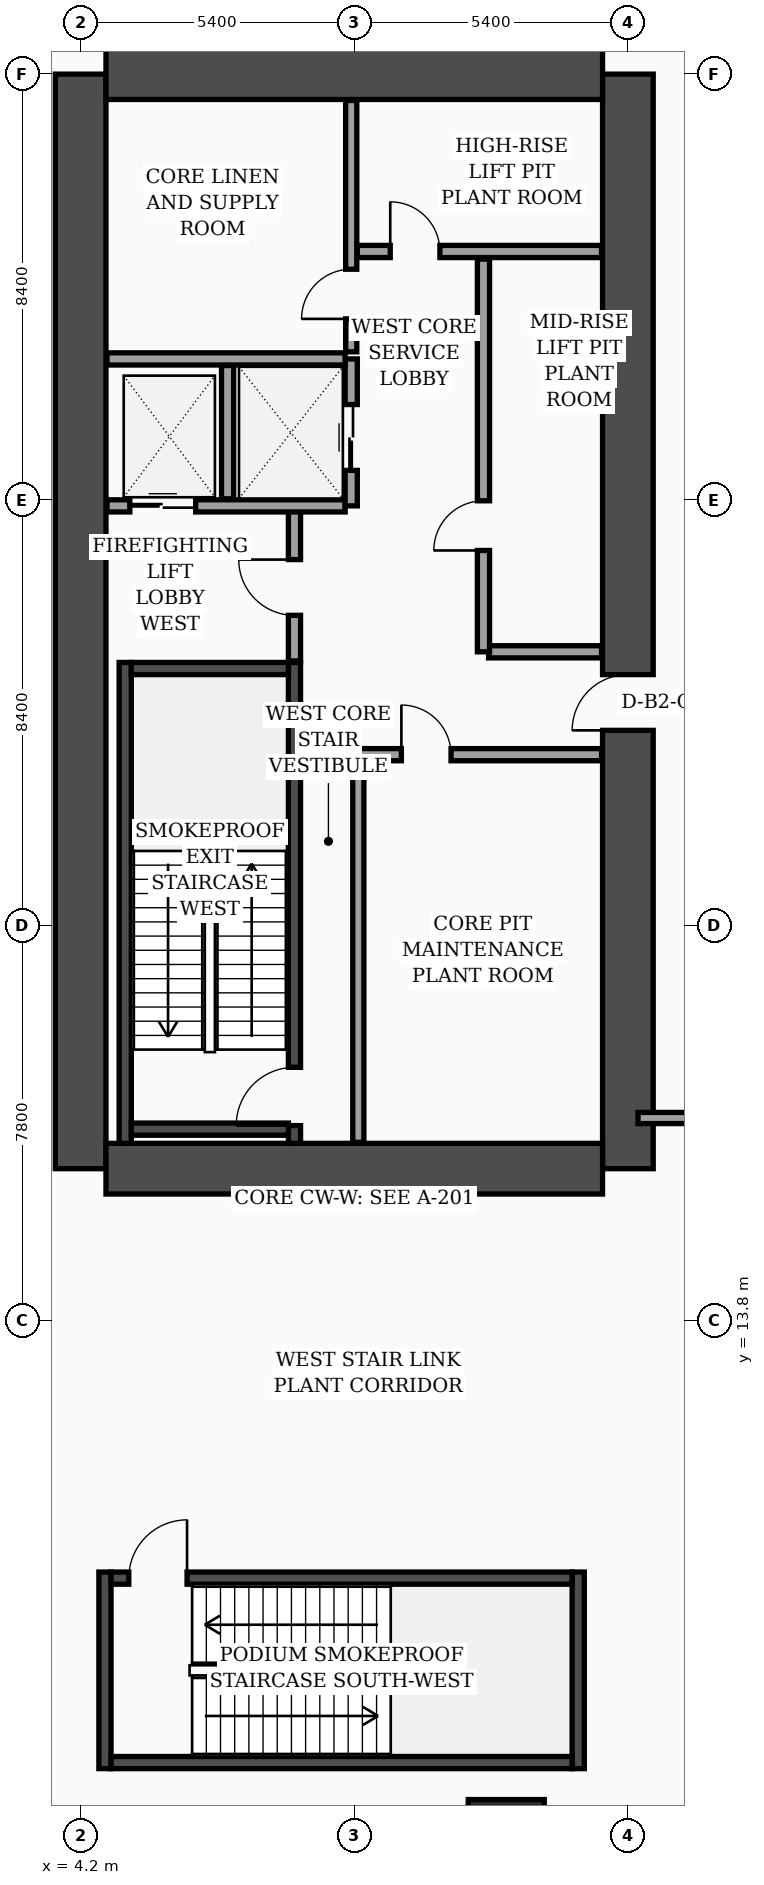
"""IFC4 building model, lengths in metres.
Left out: names, types, materials, properties, quantities, classifications, styles, units other than length and angle.
Written with IfcOpenShell. Run it as: python <this file> out.ifc"""

import sys

from ifc_helpers import new_model, si_unit, direction, frame, frame_2d, origin, origin_2d, place, context, subcontext, project, spatial, rectangle, extrude, element, fill, save


model = new_model("IFC4")
c1 = context("Model", 3, precision=1e-05, world=origin(), true_north=direction((0.0, 1.0)))
c2 = subcontext(c1, "Body", "Model", "MODEL_VIEW")
j1 = project(units=[si_unit("LENGTHUNIT", "METRE"), si_unit("PLANEANGLEUNIT", "RADIAN")], contexts=[c1])
p1 = place(None, origin())
s1 = spatial("IfcSite", under=j1, at=p1, CompositionType="ELEMENT")
p2 = place(p1, origin())
s2 = spatial("IfcBuilding", under=s1, at=p2, CompositionType="ELEMENT")
p3 = place(p2, frame((0.0, 0.0, -10.4)))
s3 = spatial("IfcBuildingStorey", under=s2, at=p3, CompositionType="ELEMENT", Elevation=-10.4)
p4 = place(p3, frame((4.2, 16.8, 0.0), z_axis=(0.0, 0.0, 1.0), x_axis=(0.0, 1.0, 0.0)))
e1 = element("IfcWall", 1, at=p4, inside=s3, PredefinedType="SHEAR", context=c2, shape_type="SweptSolid", body=[
    extrude(rectangle(XDim=21.6, YDim=1.0, at=frame_2d((10.8, 0.0))), origin(), (0.0, 0.0, 1.0), 4.88),
])
p5 = place(p3, frame((15.0, 16.8, 0.0), z_axis=(0.0, 0.0, 1.0), x_axis=(0.0, 1.0, 0.0)))
e2 = element("IfcWall", 2, at=p5, inside=s3, PredefinedType="SHEAR", context=c2, shape_type="SweptSolid", body=[
    extrude(rectangle(XDim=21.6, YDim=1.0, at=frame_2d((10.8, 0.0))), origin(), (0.0, 0.0, 1.0), 4.88),
])
p6 = place(p5, frame((8.65, 0.0, 0.0)))
e3 = element("IfcOpeningElement", 3, at=p6, cuts=e2, PredefinedType="OPENING", context=c2, shape_type="SweptSolid", body=[
    extrude(rectangle(XDim=1.1, YDim=2.2, at=frame_2d((0.55, 1.1))), frame((0.0, 0.51, 0.0), z_axis=(0.0, -1.0, 0.0), x_axis=(1.0, 0.0, 0.0)), (0.0, 0.0, 1.0), 1.02),
])
for number, where, z_axis, x_axis in (
    (4, (4.7, 38.4, 0.0), (0.0, 0.0, 1.0), (1.0, 0.0, 0.0)),
    (5, (4.7, 16.8, 0.0), (0.0, 0.0, 1.0), (1.0, 0.0, 0.0)),
):
    element("IfcWall", number, at=place(p3, frame(where, z_axis=z_axis, x_axis=x_axis)), inside=s3, PredefinedType="SHEAR", context=c2, shape_type="SweptSolid", body=[
        extrude(rectangle(XDim=9.8, YDim=1.0, at=frame_2d((4.9, 0.0))), origin(), (0.0, 0.0, 1.0), 4.88),
    ])
p7 = place(p3, frame((5.08, 17.3, 0.0), z_axis=(0.0, 0.0, 1.0), x_axis=(0.0, 1.0, 0.0)))
e6 = element("IfcWall", 6, at=p7, inside=s3, PredefinedType="SOLIDWALL", context=c2, shape_type="SweptSolid", body=[
    extrude(rectangle(XDim=9.49, YDim=0.24, at=frame_2d((4.745, 0.0))), origin(), (0.0, 0.0, 1.0), 4.88),
])
p8 = place(p3, frame((8.42, 17.3, 0.0), z_axis=(0.0, 0.0, 1.0), x_axis=(0.0, 1.0, 0.0)))
e7 = element("IfcWall", 7, at=p8, inside=s3, PredefinedType="SOLIDWALL", context=c2, shape_type="SweptSolid", body=[
    extrude(rectangle(XDim=9.49, YDim=0.24, at=frame_2d((4.745, 0.0))), origin(), (0.0, 0.0, 1.0), 4.88),
])
p9 = place(p8, frame((0.35, 0.0, 0.0)))
e8 = element("IfcOpeningElement", 8, at=p9, cuts=e7, PredefinedType="OPENING", context=c2, shape_type="SweptSolid", body=[
    extrude(rectangle(XDim=1.15, YDim=2.2, at=frame_2d((0.575, 1.1))), frame((0.0, 0.13, 0.0), z_axis=(0.0, -1.0, 0.0), x_axis=(1.0, 0.0, 0.0)), (0.0, 0.0, 1.0), 0.26),
])
for number, where, z_axis, x_axis in (
    (9, (5.2, 17.58, 0.0), (0.0, 0.0, 1.0), (1.0, 0.0, 0.0)),
    (10, (5.2, 26.67, 0.0), (0.0, 0.0, 1.0), (1.0, 0.0, 0.0)),
):
    element("IfcWall", number, at=place(p3, frame(where, z_axis=z_axis, x_axis=x_axis)), inside=s3, PredefinedType="SOLIDWALL", context=c2, shape_type="SweptSolid", body=[
        extrude(rectangle(XDim=3.1, YDim=0.24, at=frame_2d((1.55, 0.0))), origin(), (0.0, 0.0, 1.0), 4.88),
    ])
for number, where, z_axis, x_axis in (
    (11, (4.68, 4.96, 0.0), (0.0, 0.0, 1.0), (0.0, 1.0, 0.0)),
    (12, (14.02, 4.96, 0.0), (0.0, 0.0, 1.0), (0.0, 1.0, 0.0)),
):
    element("IfcWall", number, at=place(p3, frame(where, z_axis=z_axis, x_axis=x_axis)), inside=s3, PredefinedType="SOLIDWALL", context=c2, shape_type="SweptSolid", body=[
        extrude(rectangle(XDim=3.88, YDim=0.24, at=frame_2d((1.94, 0.0))), origin(), (0.0, 0.0, 1.0), 4.88),
    ])
p10 = place(p3, frame((4.8, 5.08, 0.0), z_axis=(0.0, 0.0, 1.0), x_axis=(1.0, 0.0, 0.0)))
e13 = element("IfcWall", 13, at=p10, inside=s3, PredefinedType="SOLIDWALL", context=c2, shape_type="SweptSolid", body=[
    extrude(rectangle(XDim=9.1, YDim=0.24, at=frame_2d((4.55, 0.0))), origin(), (0.0, 0.0, 1.0), 4.88),
])
p11 = place(p3, frame((4.8, 8.72, 0.0), z_axis=(0.0, 0.0, 1.0), x_axis=(1.0, 0.0, 0.0)))
e14 = element("IfcWall", 14, at=p11, inside=s3, PredefinedType="SOLIDWALL", context=c2, shape_type="SweptSolid", body=[
    extrude(rectangle(XDim=9.1, YDim=0.24, at=frame_2d((4.55, 0.0))), origin(), (0.0, 0.0, 1.0), 4.88),
])
p12 = place(p11, frame((0.35, 0.0, 0.0)))
e15 = element("IfcOpeningElement", 15, at=p12, cuts=e14, PredefinedType="OPENING", context=c2, shape_type="SweptSolid", body=[
    extrude(rectangle(XDim=1.15, YDim=2.2, at=frame_2d((0.575, 1.1))), frame((0.0, 0.13, 0.0), z_axis=(0.0, -1.0, 0.0), x_axis=(1.0, 0.0, 0.0)), (0.0, 0.0, 1.0), 0.26),
])
p13 = place(p3, frame((12.6, 3.6, 0.0), z_axis=(0.0, 0.0, 1.0), x_axis=(1.0, 0.0, 0.0)))
e16 = element("IfcColumn", 16, at=p13, inside=s3, PredefinedType="COLUMN", context=c2, shape_type="SweptSolid", body=[
    extrude(rectangle(XDim=1.5, YDim=1.5, at=origin_2d()), origin(), (0.0, 0.0, 1.0), 4.88),
])
p14 = place(p3, frame((8.42, 26.82, 0.0), z_axis=(0.0, 0.0, 1.0), x_axis=(0.0, 1.0, 0.0)))
e17 = element("IfcWall", 17, at=p14, inside=s3, PredefinedType="SOLIDWALL", context=c2, shape_type="SweptSolid", body=[
    extrude(rectangle(XDim=3.0, YDim=0.24, at=frame_2d((1.5, 0.0))), origin(), (0.0, 0.0, 1.0), 4.88),
])
p15 = place(p14, frame((0.9, 0.0, 0.0)))
e18 = element("IfcOpeningElement", 18, at=p15, cuts=e17, PredefinedType="OPENING", context=c2, shape_type="SweptSolid", body=[
    extrude(rectangle(XDim=1.1, YDim=2.2, at=frame_2d((0.55, 1.1))), frame((0.0, 0.13, 0.0), z_axis=(0.0, -1.0, 0.0), x_axis=(1.0, 0.0, 0.0)), (0.0, 0.0, 1.0), 0.26),
])
p16 = place(p3, frame((4.72, 29.88, 0.0), z_axis=(0.0, 0.0, 1.0), x_axis=(1.0, 0.0, 0.0)))
e19 = element("IfcWall", 19, at=p16, inside=s3, PredefinedType="SOLIDWALL", context=c2, shape_type="SweptSolid", body=[
    extrude(rectangle(XDim=4.7, YDim=0.24, at=frame_2d((2.35, 0.0))), origin(), (0.0, 0.0, 1.0), 4.88),
])
p17 = place(p16, frame((0.45, 0.0, 0.0)))
e20 = element("IfcOpeningElement", 20, at=p17, cuts=e19, PredefinedType="OPENING", context=c2, shape_type="SweptSolid", body=[
    extrude(rectangle(XDim=1.3, YDim=2.35, at=frame_2d((0.65, 1.175))), frame((0.0, 0.13, 0.0), z_axis=(0.0, -1.0, 0.0), x_axis=(1.0, 0.0, 0.0)), (0.0, 0.0, 1.0), 0.26),
])
p18 = place(p3, frame((7.1, 30.02, 0.0), z_axis=(0.0, 0.0, 1.0), x_axis=(0.0, 1.0, 0.0)))
e21 = element("IfcWall", 21, at=p18, inside=s3, PredefinedType="SOLIDWALL", context=c2, shape_type="SweptSolid", body=[
    extrude(rectangle(XDim=2.63, YDim=0.24, at=frame_2d((1.315, 0.0))), origin(), (0.0, 0.0, 1.0), 4.88),
])
p19 = place(p3, frame((9.54, 29.88, 0.0), z_axis=(0.0, 0.0, 1.0), x_axis=(0.0, 1.0, 0.0)))
e22 = element("IfcWall", 22, at=p19, inside=s3, PredefinedType="SOLIDWALL", context=c2, shape_type="SweptSolid", body=[
    extrude(rectangle(XDim=2.9, YDim=0.24, at=frame_2d((1.45, 0.0))), origin(), (0.0, 0.0, 1.0), 4.88),
])
p20 = place(p19, frame((0.7, 0.0, 0.0)))
e23 = element("IfcOpeningElement", 23, at=p20, cuts=e22, PredefinedType="OPENING", context=c2, shape_type="SweptSolid", body=[
    extrude(rectangle(XDim=1.3, YDim=2.35, at=frame_2d((0.65, 1.175))), frame((0.0, 0.13, 0.0), z_axis=(0.0, -1.0, 0.0), x_axis=(1.0, 0.0, 0.0)), (0.0, 0.0, 1.0), 0.26),
])
p21 = place(p3, frame((4.72, 32.78, 0.0), z_axis=(0.0, 0.0, 1.0), x_axis=(1.0, 0.0, 0.0)))
e24 = element("IfcWall", 24, at=p21, inside=s3, PredefinedType="SOLIDWALL", context=c2, shape_type="SweptSolid", body=[
    extrude(rectangle(XDim=4.7, YDim=0.24, at=frame_2d((2.35, 0.0))), origin(), (0.0, 0.0, 1.0), 4.88),
])
p22 = place(p3, frame((9.68, 17.32, 0.0), z_axis=(0.0, 0.0, 1.0), x_axis=(0.0, 1.0, 0.0)))
e25 = element("IfcWall", 25, at=p22, inside=s3, PredefinedType="SOLIDWALL", context=c2, shape_type="SweptSolid", body=[
    extrude(rectangle(XDim=7.68, YDim=0.22, at=frame_2d((3.84, 0.0))), origin(), (0.0, 0.0, 1.0), 4.88),
])
p23 = place(p3, frame((9.54, 32.92, 0.0), z_axis=(0.0, 0.0, 1.0), x_axis=(0.0, 1.0, 0.0)))
e26 = element("IfcWall", 26, at=p23, inside=s3, PredefinedType="SOLIDWALL", context=c2, shape_type="SweptSolid", body=[
    extrude(rectangle(XDim=4.96, YDim=0.22, at=frame_2d((2.48, 0.0))), origin(), (0.0, 0.0, 1.0), 4.88),
])
p24 = place(p23, frame((0.65, 0.0, 0.0)))
e27 = element("IfcOpeningElement", 27, at=p24, cuts=e26, PredefinedType="OPENING", context=c2, shape_type="SweptSolid", body=[
    extrude(rectangle(XDim=0.98, YDim=2.15, at=frame_2d((0.49, 1.075))), frame((0.0, 0.12, 0.0), z_axis=(0.0, -1.0, 0.0), x_axis=(1.0, 0.0, 0.0)), (0.0, 0.0, 1.0), 0.24),
])
p25 = place(p3, frame((9.68, 24.97, 0.0), z_axis=(0.0, 0.0, 1.0), x_axis=(1.0, 0.0, 0.0)))
e28 = element("IfcWall", 28, at=p25, inside=s3, PredefinedType="SOLIDWALL", context=c2, shape_type="SweptSolid", body=[
    extrude(rectangle(XDim=4.8, YDim=0.24, at=frame_2d((2.4, 0.0))), origin(), (0.0, 0.0, 1.0), 4.08),
])
p26 = place(p25, frame((0.85, 0.0, 0.0)))
e29 = element("IfcOpeningElement", 29, at=p26, cuts=e28, PredefinedType="OPENING", context=c2, shape_type="SweptSolid", body=[
    extrude(rectangle(XDim=0.98, YDim=2.15, at=frame_2d((0.49, 1.075))), frame((0.0, 0.13, 0.0), z_axis=(0.0, -1.0, 0.0), x_axis=(1.0, 0.0, 0.0)), (0.0, 0.0, 1.0), 0.26),
])
p27 = place(p3, frame((12.25, 27.0, 0.0), z_axis=(0.0, 0.0, 1.0), x_axis=(1.0, 0.0, 0.0)))
e30 = element("IfcWall", 30, at=p27, inside=s3, PredefinedType="SOLIDWALL", context=c2, shape_type="SweptSolid", body=[
    extrude(rectangle(XDim=2.23, YDim=0.24, at=frame_2d((1.115, 0.0))), origin(), (0.0, 0.0, 1.0), 4.88),
])
p28 = place(p3, frame((12.15, 27.0, 0.0), z_axis=(0.0, 0.0, 1.0), x_axis=(0.0, 1.0, 0.0)))
e31 = element("IfcWall", 31, at=p28, inside=s3, PredefinedType="SOLIDWALL", context=c2, shape_type="SweptSolid", body=[
    extrude(rectangle(XDim=7.75, YDim=0.24, at=frame_2d((3.875, 0.0))), origin(), (0.0, 0.0, 1.0), 4.88),
])
p29 = place(p28, frame((2.0, 0.0, 0.0)))
e32 = element("IfcOpeningElement", 32, at=p29, cuts=e31, PredefinedType="OPENING", context=c2, shape_type="SweptSolid", body=[
    extrude(rectangle(XDim=0.98, YDim=2.15, at=frame_2d((0.49, 1.075))), frame((0.0, 0.13, 0.0), z_axis=(0.0, -1.0, 0.0), x_axis=(1.0, 0.0, 0.0)), (0.0, 0.0, 1.0), 0.26),
])
p30 = place(p3, frame((9.66, 34.9, 0.0), z_axis=(0.0, 0.0, 1.0), x_axis=(1.0, 0.0, 0.0)))
e33 = element("IfcWall", 33, at=p30, inside=s3, PredefinedType="SOLIDWALL", context=c2, shape_type="SweptSolid", body=[
    extrude(rectangle(XDim=4.82, YDim=0.24, at=frame_2d((2.41, 0.0))), origin(), (0.0, 0.0, 1.0), 4.88),
])
p31 = place(p30, frame((0.65, 0.0, 0.0)))
e34 = element("IfcOpeningElement", 34, at=p31, cuts=e33, PredefinedType="OPENING", context=c2, shape_type="SweptSolid", body=[
    extrude(rectangle(XDim=0.98, YDim=2.15, at=frame_2d((0.49, 1.075))), frame((0.0, 0.13, 0.0), z_axis=(0.0, -1.0, 0.0), x_axis=(1.0, 0.0, 0.0)), (0.0, 0.0, 1.0), 0.26),
])
p32 = place(p3, frame((15.2, 17.8, 0.0), z_axis=(0.0, 0.0, 1.0), x_axis=(1.0, 0.0, 0.0)))
e35 = element("IfcWall", 35, at=p32, inside=s3, PredefinedType="SOLIDWALL", context=c2, shape_type="SweptSolid", body=[
    extrude(rectangle(XDim=34.9, YDim=0.22, at=frame_2d((17.45, 0.0))), origin(), (0.0, 0.0, 1.0), 3.28),
])
p33 = place(p32, frame((6.0, 0.0, 0.0)))
e36 = element("IfcOpeningElement", 36, at=p33, cuts=e35, PredefinedType="OPENING", context=c2, shape_type="SweptSolid", body=[
    extrude(rectangle(XDim=1.6, YDim=2.35, at=frame_2d((0.8, 1.175))), frame((0.0, 0.12, 0.0), z_axis=(0.0, -1.0, 0.0), x_axis=(1.0, 0.0, 0.0)), (0.0, 0.0, 1.0), 0.24),
])
p34 = place(p32, frame((25.0, 0.0, 0.0)))
e37 = element("IfcOpeningElement", 37, at=p34, cuts=e35, PredefinedType="OPENING", context=c2, shape_type="SweptSolid", body=[
    extrude(rectangle(XDim=1.6, YDim=2.35, at=frame_2d((0.8, 1.175))), frame((0.0, 0.12, 0.0), z_axis=(0.0, -1.0, 0.0), x_axis=(1.0, 0.0, 0.0)), (0.0, 0.0, 1.0), 0.24),
])
p35 = place(p15, origin())
e38 = element("IfcDoor", 38, at=p35, inside=s3, OperationType="SINGLE_SWING_RIGHT", PredefinedType="DOOR", context=c2, shape_type="SweptSolid", body=[
    extrude(rectangle(XDim=1.1, YDim=2.2, at=frame_2d((0.55, 1.1))), frame((0.0, 0.025, 0.0), z_axis=(0.0, -1.0, 0.0), x_axis=(1.0, 0.0, 0.0)), (0.0, 0.0, 1.0), 0.05),
])
fill(e18, e38)
p36 = place(p17, origin())
e39 = element("IfcDoor", 39, at=p36, inside=s3, OperationType="DOUBLE_DOOR_SLIDING", PredefinedType="DOOR", context=c2, shape_type="SweptSolid", body=[
    extrude(rectangle(XDim=1.3, YDim=2.35, at=frame_2d((0.65, 1.175))), frame((0.0, 0.025, 0.0), z_axis=(0.0, -1.0, 0.0), x_axis=(1.0, 0.0, 0.0)), (0.0, 0.0, 1.0), 0.05),
])
fill(e20, e39)
p37 = place(p20, origin())
e40 = element("IfcDoor", 40, at=p37, inside=s3, OperationType="DOUBLE_DOOR_SLIDING", PredefinedType="DOOR", context=c2, shape_type="SweptSolid", body=[
    extrude(rectangle(XDim=1.3, YDim=2.35, at=frame_2d((0.65, 1.175))), frame((0.0, 0.025, 0.0), z_axis=(0.0, -1.0, 0.0), x_axis=(1.0, 0.0, 0.0)), (0.0, 0.0, 1.0), 0.05),
])
fill(e23, e40)
p38 = place(p24, origin())
e41 = element("IfcDoor", 41, at=p38, inside=s3, OperationType="SINGLE_SWING_LEFT", PredefinedType="DOOR", context=c2, shape_type="SweptSolid", body=[
    extrude(rectangle(XDim=0.98, YDim=2.15, at=frame_2d((0.49, 1.075))), frame((0.0, 0.025, 0.0), z_axis=(0.0, -1.0, 0.0), x_axis=(1.0, 0.0, 0.0)), (0.0, 0.0, 1.0), 0.05),
])
fill(e27, e41)
p39 = place(p26, origin())
e42 = element("IfcDoor", 42, at=p39, inside=s3, OperationType="SINGLE_SWING_LEFT", PredefinedType="DOOR", context=c2, shape_type="SweptSolid", body=[
    extrude(rectangle(XDim=0.98, YDim=2.15, at=frame_2d((0.49, 1.075))), frame((0.0, 0.025, 0.0), z_axis=(0.0, -1.0, 0.0), x_axis=(1.0, 0.0, 0.0)), (0.0, 0.0, 1.0), 0.05),
])
fill(e29, e42)
p40 = place(p29, origin())
e43 = element("IfcDoor", 43, at=p40, inside=s3, OperationType="SINGLE_SWING_LEFT", PredefinedType="DOOR", context=c2, shape_type="SweptSolid", body=[
    extrude(rectangle(XDim=0.98, YDim=2.15, at=frame_2d((0.49, 1.075))), frame((0.0, 0.025, 0.0), z_axis=(0.0, -1.0, 0.0), x_axis=(1.0, 0.0, 0.0)), (0.0, 0.0, 1.0), 0.05),
])
fill(e32, e43)
p41 = place(p31, origin())
e44 = element("IfcDoor", 44, at=p41, inside=s3, OperationType="SINGLE_SWING_LEFT", PredefinedType="DOOR", context=c2, shape_type="SweptSolid", body=[
    extrude(rectangle(XDim=0.98, YDim=2.15, at=frame_2d((0.49, 1.075))), frame((0.0, 0.025, 0.0), z_axis=(0.0, -1.0, 0.0), x_axis=(1.0, 0.0, 0.0)), (0.0, 0.0, 1.0), 0.05),
])
fill(e34, e44)
p42 = place(p9, origin())
e45 = element("IfcDoor", 45, at=p42, inside=s3, OperationType="SINGLE_SWING_LEFT", PredefinedType="DOOR", context=c2, shape_type="SweptSolid", body=[
    extrude(rectangle(XDim=1.15, YDim=2.2, at=frame_2d((0.575, 1.1))), frame((0.0, 0.025, 0.0), z_axis=(0.0, -1.0, 0.0), x_axis=(1.0, 0.0, 0.0)), (0.0, 0.0, 1.0), 0.05),
])
fill(e8, e45)
p43 = place(p12, origin())
e46 = element("IfcDoor", 46, at=p43, inside=s3, OperationType="SINGLE_SWING_RIGHT", PredefinedType="DOOR", context=c2, shape_type="SweptSolid", body=[
    extrude(rectangle(XDim=1.15, YDim=2.2, at=frame_2d((0.575, 1.1))), frame((0.0, 0.025, 0.0), z_axis=(0.0, -1.0, 0.0), x_axis=(1.0, 0.0, 0.0)), (0.0, 0.0, 1.0), 0.05),
])
fill(e15, e46)
p44 = place(p6, origin())
e47 = element("IfcDoor", 47, at=p44, inside=s3, OperationType="SINGLE_SWING_LEFT", PredefinedType="DOOR", context=c2, shape_type="SweptSolid", body=[
    extrude(rectangle(XDim=1.1, YDim=2.2, at=frame_2d((0.55, 1.1))), frame((0.0, 0.025, 0.0), z_axis=(0.0, -1.0, 0.0), x_axis=(1.0, 0.0, 0.0)), (0.0, 0.0, 1.0), 0.05),
])
fill(e3, e47)
save(model, sys.argv[1])
